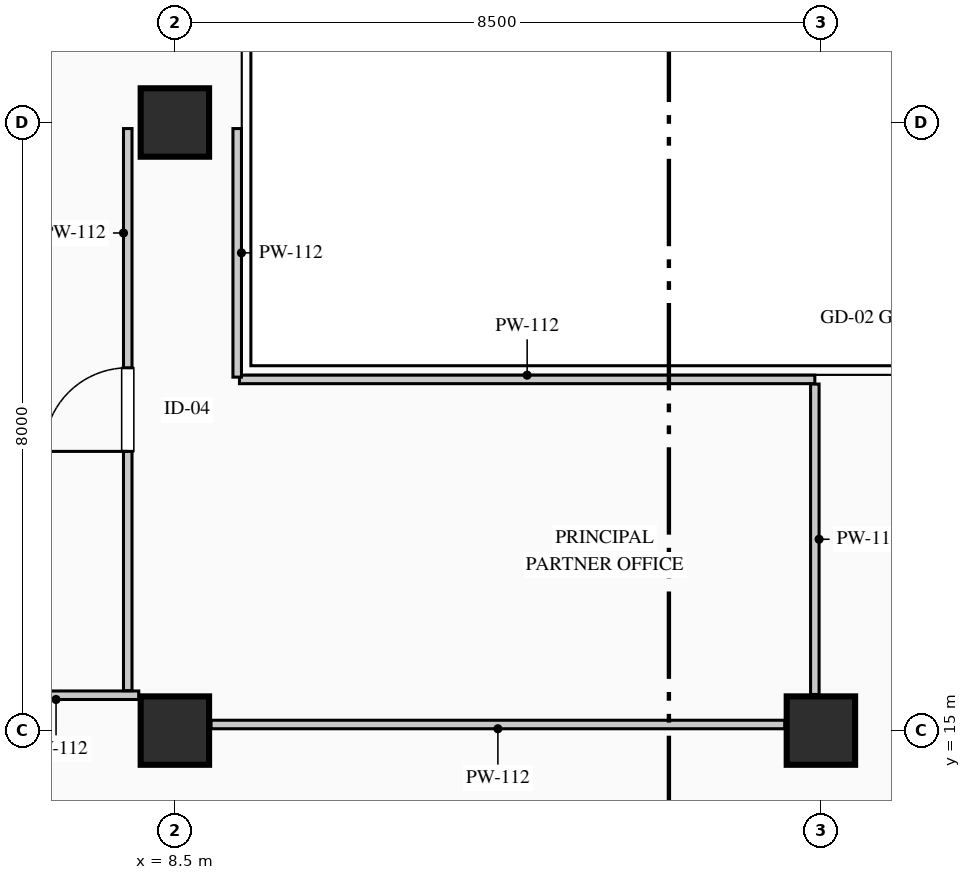
"""IFC4 building model, lengths in metres.
Left out: names, types, materials, properties, quantities, classifications, styles, units other than length and angle.
Written with IfcOpenShell. Run it as: python <this file> out.ifc"""

import sys

from ifc_helpers import new_model, si_unit, direction, frame, frame_2d, origin, origin_2d, place, context, subcontext, project, spatial, rectangle, extrude, element, fill, save


model = new_model("IFC4")
c1 = context("Model", 3, precision=1e-05, world=origin(), true_north=direction((0.0, 1.0)))
c2 = subcontext(c1, "Body", "Model", "MODEL_VIEW")
j1 = project(units=[si_unit("LENGTHUNIT", "METRE"), si_unit("PLANEANGLEUNIT", "RADIAN")], contexts=[c1])
p1 = place(None, origin())
s1 = spatial("IfcSite", under=j1, at=p1, CompositionType="ELEMENT")
p2 = place(p1, origin())
s2 = spatial("IfcBuilding", under=s1, at=p2, CompositionType="ELEMENT")
p3 = place(p2, frame((0.0, 0.0, 239.05)))
s3 = spatial("IfcBuildingStorey", under=s2, at=p3, CompositionType="ELEMENT", Elevation=239.05)
for number, where, z_axis, x_axis in (
    (1, (8.5, 15.0, 0.0), (0.0, 0.0, 1.0), (1.0, 0.0, 0.0)),
    (2, (8.5, 23.0, 0.0), (0.0, 0.0, 1.0), (1.0, 0.0, 0.0)),
    (3, (17.0, 15.0, 0.0), (0.0, 0.0, 1.0), (1.0, 0.0, 0.0)),
):
    element("IfcColumn", number, at=place(p3, frame(where, z_axis=z_axis, x_axis=x_axis)), inside=s3, PredefinedType="COLUMN", context=c2, shape_type="SweptSolid", body=[
        extrude(rectangle(XDim=0.9, YDim=0.9, at=origin_2d()), origin(), (0.0, 0.0, 1.0), 3.95),
    ])
p4 = place(p3, frame((6.933, 4.52, 0.0), z_axis=(0.0, 0.0, 1.0), x_axis=(-0.109965284523, 0.993935428587, 0.0)))
e4 = element("IfcWall", 4, at=p4, inside=s3, PredefinedType="STANDARD", context=c2, shape_type="SweptSolid", body=[
    extrude(rectangle(XDim=37.186, YDim=0.24, at=frame_2d((18.593, 0.0))), origin(), (0.0, 0.0, 1.0), 3.7),
])
p5 = place(p4, frame((12.562, 0.0, 0.9)))
e5 = element("IfcOpeningElement", 5, at=p5, cuts=e4, PredefinedType="OPENING", context=c2, shape_type="SweptSolid", body=[
    extrude(rectangle(XDim=1.65, YDim=1.95, at=frame_2d((0.825, 0.975))), frame((0.0, 0.13, 0.0), z_axis=(0.0, -1.0, 0.0), x_axis=(1.0, 0.0, 0.0)), (0.0, 0.0, 1.0), 0.26),
])
p6 = place(p3, frame((9.35, 19.62, 0.0), z_axis=(0.0, 0.0, 1.0), x_axis=(1.0, 0.0, 0.0)))
e6 = element("IfcWall", 6, at=p6, inside=s3, PredefinedType="PARTITIONING", context=c2, shape_type="SweptSolid", body=[
    extrude(rectangle(XDim=7.57, YDim=0.112, at=frame_2d((3.785, 0.0))), origin(), (0.0, 0.0, 1.0), 3.7),
])
p7 = place(p3, frame((16.92, 19.559, 0.0), z_axis=(0.0, 0.0, 1.0), x_axis=(0.0, -1.0, 0.0)))
e7 = element("IfcWall", 7, at=p7, inside=s3, PredefinedType="PARTITIONING", context=c2, shape_type="SweptSolid", body=[
    extrude(rectangle(XDim=4.084, YDim=0.112, at=frame_2d((2.042, 0.0))), origin(), (0.0, 0.0, 1.0), 3.7),
])
p8 = place(p3, frame((16.525, 15.08, 0.0), z_axis=(0.0, 0.0, 1.0), x_axis=(-1.0, 0.0, 0.0)))
e8 = element("IfcWall", 8, at=p8, inside=s3, PredefinedType="PARTITIONING", context=c2, shape_type="SweptSolid", body=[
    extrude(rectangle(XDim=7.55, YDim=0.112, at=frame_2d((3.775, 0.0))), origin(), (0.0, 0.0, 1.0), 3.185),
])
p9 = place(p3, frame((8.025, 15.465, 0.0), z_axis=(0.0, 0.0, 1.0), x_axis=(-1.0, 0.0, 0.0)))
e9 = element("IfcWall", 9, at=p9, inside=s3, PredefinedType="PARTITIONING", context=c2, shape_type="SweptSolid", body=[
    extrude(rectangle(XDim=2.177, YDim=0.112, at=frame_2d((1.088, 0.0))), origin(), (0.0, 0.0, 1.0), 3.7),
])
p10 = place(p3, frame((7.88, 15.526, 0.0), z_axis=(0.0, 0.0, 1.0), x_axis=(0.0, 1.0, 0.0)))
e10 = element("IfcWall", 10, at=p10, inside=s3, PredefinedType="PARTITIONING", context=c2, shape_type="SweptSolid", body=[
    extrude(rectangle(XDim=7.394, YDim=0.112, at=frame_2d((3.697, 0.0))), origin(), (0.0, 0.0, 1.0), 3.7),
])
p11 = place(p10, frame((3.147, 0.0, 0.0)))
e11 = element("IfcOpeningElement", 11, at=p11, cuts=e10, PredefinedType="OPENING", context=c2, shape_type="SweptSolid", body=[
    extrude(rectangle(XDim=1.1, YDim=2.2, at=frame_2d((0.55, 1.1))), frame((0.0, 0.066, 0.0), z_axis=(0.0, -1.0, 0.0), x_axis=(1.0, 0.0, 0.0)), (0.0, 0.0, 1.0), 0.132),
])
p12 = place(p3, frame((9.32, 22.92, 0.0), z_axis=(0.0, 0.0, 1.0), x_axis=(0.0, -1.0, 0.0)))
e12 = element("IfcWall", 12, at=p12, inside=s3, PredefinedType="PARTITIONING", context=c2, shape_type="SweptSolid", body=[
    extrude(rectangle(XDim=3.27, YDim=0.112, at=frame_2d((1.635, 0.0))), origin(), (0.0, 0.0, 1.0), 3.325),
])
p13 = place(p11, origin())
e13 = element("IfcDoor", 13, at=p13, inside=s3, OperationType="SINGLE_SWING_LEFT", PredefinedType="DOOR", context=c2, shape_type="SweptSolid", body=[
    extrude(rectangle(XDim=1.1, YDim=2.2, at=frame_2d((0.55, 1.1))), frame((0.0, 0.025, 0.0), z_axis=(0.0, -1.0, 0.0), x_axis=(1.0, 0.0, 0.0)), (0.0, 0.0, 1.0), 0.05),
])
fill(e11, e13)
save(model, sys.argv[1])
